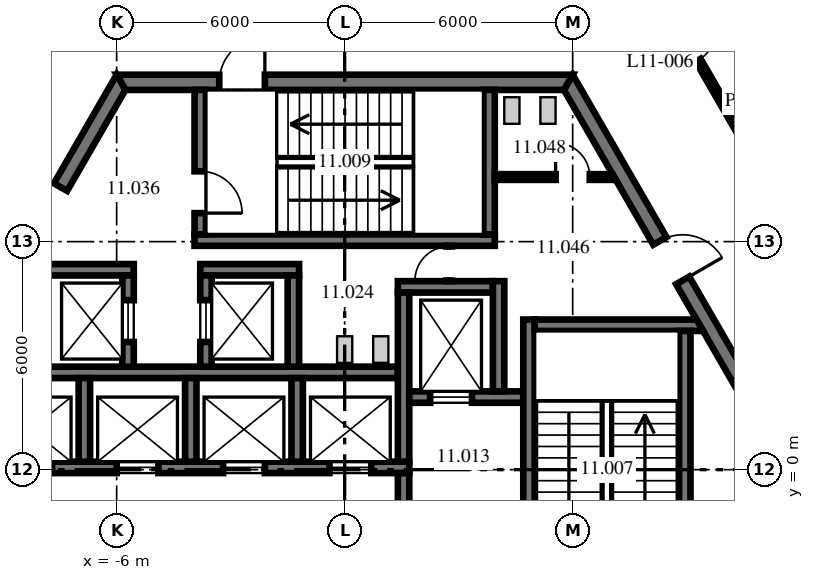
"""IFC4 building model, lengths in metres.
Left out: names, types, materials, properties, quantities, classifications, styles, units other than length and angle.
Written with IfcOpenShell. Run it as: python <this file> out.ifc"""

import sys

from ifc_helpers import new_model, si_unit, direction, frame, frame_2d, origin, place, context, subcontext, project, spatial, polyline, rectangle, outline, extrude, source, transform, mapped, element, fill, save


model = new_model("IFC4")
c1 = context("Model", 3, precision=1e-05, world=origin(), true_north=direction((0.0, 1.0)))
c2 = subcontext(c1, "Body", "Model", "MODEL_VIEW")
j1 = project(units=[si_unit("LENGTHUNIT", "METRE"), si_unit("PLANEANGLEUNIT", "RADIAN")], contexts=[c1])
p1 = place(None, origin())
s1 = spatial("IfcSite", under=j1, at=p1, CompositionType="ELEMENT")
p2 = place(p1, origin())
s2 = spatial("IfcBuilding", under=s1, at=p2, CompositionType="ELEMENT")
p3 = place(p2, frame((0.0, 0.0, 50.4)))
s3 = spatial("IfcBuildingStorey", under=s2, at=p3, CompositionType="ELEMENT", Elevation=50.4)
m1 = source(origin(), c2, "Body", "SweptSolid", [
    extrude(outline(polyline([(-0.115, -0.2), (11.885, -0.2), (11.654, 0.2), (0.115, 0.2), (-0.115, -0.2)])), origin(), (0.0, 0.0, 1.0), 4.05),
])
p4 = place(p3, frame((11.769, 0.0, 0.0), z_axis=(0.0, 0.0, 1.0), x_axis=(-0.499996592174, 0.866027371285, 0.0)))
e1 = element("IfcWall", 1, at=p4, inside=s3, PredefinedType="SHEAR", context=c2, shape_type="MappedRepresentation", body=[
    mapped(m1, transform((0.0, 0.0, 0.0), scale=1.0)),
])
p5 = place(p4, frame((5.75, 0.0, 0.0)))
e2 = element("IfcOpeningElement", 2, at=p5, cuts=e1, PredefinedType="OPENING", context=c2, shape_type="SweptSolid", body=[
    extrude(rectangle(XDim=1.2, YDim=2.1, at=frame_2d((0.6, 1.05))), frame((0.0, 0.21, 0.0), z_axis=(0.0, -1.0, 0.0), x_axis=(1.0, 0.0, 0.0)), (0.0, 0.0, 1.0), 0.42),
])
p6 = place(p3, frame((5.885, 10.192, 0.0), z_axis=(0.0, 0.0, 1.0), x_axis=(-1.0, 0.0, 0.0)))
e3 = element("IfcWall", 3, at=p6, inside=s3, PredefinedType="SHEAR", context=c2, shape_type="MappedRepresentation", body=[
    mapped(m1, transform((0.0, 0.0, 0.0), scale=1.0)),
])
p7 = place(p6, frame((7.985, 0.0, 0.0)))
e4 = element("IfcOpeningElement", 4, at=p7, cuts=e3, PredefinedType="OPENING", context=c2, shape_type="SweptSolid", body=[
    extrude(rectangle(XDim=1.2, YDim=2.1, at=frame_2d((0.6, 1.05))), frame((0.0, 0.21, 0.0), z_axis=(0.0, -1.0, 0.0), x_axis=(1.0, 0.0, 0.0)), (0.0, 0.0, 1.0), 0.42),
])
p8 = place(p3, frame((-5.885, 10.192, 0.0), z_axis=(0.0, 0.0, 1.0), x_axis=(-0.499996592174, -0.866027371285, 0.0)))
e5 = element("IfcWall", 5, at=p8, inside=s3, PredefinedType="SHEAR", context=c2, shape_type="MappedRepresentation", body=[
    mapped(m1, transform((0.0, 0.0, 0.0), scale=1.0)),
])
p9 = place(p8, frame((3.185, 0.0, 0.0)))
e6 = element("IfcOpeningElement", 6, at=p9, cuts=e5, PredefinedType="OPENING", context=c2, shape_type="SweptSolid", body=[
    extrude(rectangle(XDim=1.2, YDim=2.1, at=frame_2d((0.6, 1.05))), frame((0.0, 0.21, 0.0), z_axis=(0.0, -1.0, 0.0), x_axis=(1.0, 0.0, 0.0)), (0.0, 0.0, 1.0), 0.42),
])
p10 = place(p3, frame((-11.769, 0.0, 0.0), z_axis=(0.0, 0.0, 1.0), x_axis=(0.499996592174, -0.866027371285, 0.0)))
e7 = element("IfcWall", 7, at=p10, inside=s3, PredefinedType="SHEAR", context=c2, shape_type="MappedRepresentation", body=[
    mapped(m1, transform((0.0, 0.0, 0.0), scale=1.0)),
])
p11 = place(p10, frame((1.405, 0.0, 0.0)))
e8 = element("IfcOpeningElement", 8, at=p11, cuts=e7, PredefinedType="OPENING", context=c2, shape_type="SweptSolid", body=[
    extrude(rectangle(XDim=1.8, YDim=2.1, at=frame_2d((0.9, 1.05))), frame((0.0, 0.21, 0.0), z_axis=(0.0, -1.0, 0.0), x_axis=(1.0, 0.0, 0.0)), (0.0, 0.0, 1.0), 0.42),
])
p12 = place(p10, frame((7.915, 0.0, 0.0)))
e9 = element("IfcOpeningElement", 9, at=p12, cuts=e7, PredefinedType="OPENING", context=c2, shape_type="SweptSolid", body=[
    extrude(rectangle(XDim=1.2, YDim=2.1, at=frame_2d((0.6, 1.05))), frame((0.0, 0.21, 0.0), z_axis=(0.0, -1.0, 0.0), x_axis=(1.0, 0.0, 0.0)), (0.0, 0.0, 1.0), 0.42),
])
p13 = place(p3, frame((5.885, -10.192, 0.0), z_axis=(0.0, 0.0, 1.0), x_axis=(0.499996592174, 0.866027371285, 0.0)))
e10 = element("IfcWall", 10, at=p13, inside=s3, PredefinedType="SHEAR", context=c2, shape_type="MappedRepresentation", body=[
    mapped(m1, transform((0.0, 0.0, 0.0), scale=1.0)),
])
p14 = place(p13, frame((3.665, 0.0, 0.0)))
e11 = element("IfcOpeningElement", 11, at=p14, cuts=e10, PredefinedType="OPENING", context=c2, shape_type="SweptSolid", body=[
    extrude(rectangle(XDim=1.2, YDim=2.1, at=frame_2d((0.6, 1.05))), frame((0.0, 0.21, 0.0), z_axis=(0.0, -1.0, 0.0), x_axis=(1.0, 0.0, 0.0)), (0.0, 0.0, 1.0), 0.42),
])
p15 = place(p3, frame((-9.8, 0.06, 0.0), z_axis=(0.0, 0.0, 1.0), x_axis=(1.0, 0.0, 0.0)))
e12 = element("IfcWall", 12, at=p15, inside=s3, PredefinedType="SHEAR", context=c2, shape_type="SweptSolid", body=[
    extrude(rectangle(XDim=11.5, YDim=0.3, at=frame_2d((5.75, 0.0))), origin(), (0.0, 0.0, 1.0), 4.05),
])
p16 = place(p15, frame((1.0, 0.0, 0.0)))
e13 = element("IfcOpeningElement", 13, at=p16, cuts=e12, PredefinedType="OPENING", context=c2, shape_type="SweptSolid", body=[
    extrude(rectangle(XDim=1.1, YDim=2.1, at=frame_2d((0.55, 1.05))), frame((0.0, 0.16, 0.0), z_axis=(0.0, -1.0, 0.0), x_axis=(1.0, 0.0, 0.0)), (0.0, 0.0, 1.0), 0.32),
])
p17 = place(p15, frame((3.8, 0.0, 0.0)))
e14 = element("IfcOpeningElement", 14, at=p17, cuts=e12, PredefinedType="OPENING", context=c2, shape_type="SweptSolid", body=[
    extrude(rectangle(XDim=1.1, YDim=2.1, at=frame_2d((0.55, 1.05))), frame((0.0, 0.16, 0.0), z_axis=(0.0, -1.0, 0.0), x_axis=(1.0, 0.0, 0.0)), (0.0, 0.0, 1.0), 0.32),
])
p18 = place(p15, frame((6.6, 0.0, 0.0)))
e15 = element("IfcOpeningElement", 15, at=p18, cuts=e12, PredefinedType="OPENING", context=c2, shape_type="SweptSolid", body=[
    extrude(rectangle(XDim=1.1, YDim=2.1, at=frame_2d((0.55, 1.05))), frame((0.0, 0.16, 0.0), z_axis=(0.0, -1.0, 0.0), x_axis=(1.0, 0.0, 0.0)), (0.0, 0.0, 1.0), 0.32),
])
p19 = place(p15, frame((9.4, 0.0, 0.0)))
e16 = element("IfcOpeningElement", 16, at=p19, cuts=e12, PredefinedType="OPENING", context=c2, shape_type="SweptSolid", body=[
    extrude(rectangle(XDim=1.1, YDim=2.1, at=frame_2d((0.55, 1.05))), frame((0.0, 0.16, 0.0), z_axis=(0.0, -1.0, 0.0), x_axis=(1.0, 0.0, 0.0)), (0.0, 0.0, 1.0), 0.32),
])
p20 = place(p3, frame((-9.8, 2.56, 0.0), z_axis=(0.0, 0.0, 1.0), x_axis=(1.0, 0.0, 0.0)))
e17 = element("IfcWall", 17, at=p20, inside=s3, PredefinedType="SHEAR", context=c2, shape_type="SweptSolid", body=[
    extrude(outline(polyline([(11.2, -0.15), (-0.349, -0.15), (-0.176, 0.15), (11.2, 0.15), (11.2, -0.15)])), origin(), (0.0, 0.0, 1.0), 4.05),
])
m2 = source(origin(), c2, "Body", "SweptSolid", [
    extrude(rectangle(XDim=2.5, YDim=0.3, at=frame_2d((1.25, 0.0))), origin(), (0.0, 0.0, 1.0), 4.05),
])
p21 = place(p3, frame((1.4, 4.81, 0.0), z_axis=(0.0, 0.0, 1.0), x_axis=(1.0, 0.0, 0.0)))
e18 = element("IfcWall", 18, at=p21, inside=s3, PredefinedType="SHEAR", context=c2, shape_type="MappedRepresentation", body=[
    mapped(m2, transform((0.0, 0.0, 0.0), scale=1.0)),
])
p22 = place(p3, frame((1.55, 0.21, 0.0), z_axis=(0.0, 0.0, 1.0), x_axis=(0.0, 1.0, 0.0)))
e19 = element("IfcWall", 19, at=p22, inside=s3, PredefinedType="SHEAR", context=c2, shape_type="SweptSolid", body=[
    extrude(rectangle(XDim=4.45, YDim=0.3, at=frame_2d((2.225, 0.0))), origin(), (0.0, 0.0, 1.0), 4.05),
])
m3 = source(origin(), c2, "Body", "SweptSolid", [
    extrude(rectangle(XDim=3.0, YDim=0.3, at=frame_2d((1.5, 0.0))), origin(), (0.0, 0.0, 1.0), 4.05),
])
p23 = place(p3, frame((1.7, 1.91, 0.0), z_axis=(0.0, 0.0, 1.0), x_axis=(1.0, 0.0, 0.0)))
e20 = element("IfcWall", 20, at=p23, inside=s3, PredefinedType="SHEAR", context=c2, shape_type="MappedRepresentation", body=[
    mapped(m3, transform((0.0, 0.0, 0.0), scale=1.0)),
])
p24 = place(p23, frame((0.55, 0.0, 0.0)))
e21 = element("IfcOpeningElement", 21, at=p24, cuts=e20, PredefinedType="OPENING", context=c2, shape_type="SweptSolid", body=[
    extrude(rectangle(XDim=1.1, YDim=2.1, at=frame_2d((0.55, 1.05))), frame((0.0, 0.16, 0.0), z_axis=(0.0, -1.0, 0.0), x_axis=(1.0, 0.0, 0.0)), (0.0, 0.0, 1.0), 0.32),
])
p25 = place(p3, frame((4.05, 2.06, 0.0), z_axis=(0.0, 0.0, 1.0), x_axis=(0.0, 1.0, 0.0)))
e22 = element("IfcWall", 22, at=p25, inside=s3, PredefinedType="SHEAR", context=c2, shape_type="SweptSolid", body=[
    extrude(rectangle(XDim=2.9, YDim=0.3, at=frame_2d((1.45, 0.0))), origin(), (0.0, 0.0, 1.0), 4.05),
])
p26 = place(p3, frame((1.55, -3.09, 0.0), z_axis=(0.0, 0.0, 1.0), x_axis=(0.0, 1.0, 0.0)))
e23 = element("IfcWall", 23, at=p26, inside=s3, PredefinedType="SHEAR", context=c2, shape_type="MappedRepresentation", body=[
    mapped(m3, transform((0.0, 0.0, 0.0), scale=1.0)),
])
p27 = place(p26, frame((0.9, 0.0, 0.0)))
e24 = element("IfcOpeningElement", 24, at=p27, cuts=e23, PredefinedType="OPENING", context=c2, shape_type="SweptSolid", body=[
    extrude(rectangle(XDim=1.2, YDim=2.1, at=frame_2d((0.6, 1.05))), frame((0.0, 0.16, 0.0), z_axis=(0.0, -1.0, 0.0), x_axis=(1.0, 0.0, 0.0)), (0.0, 0.0, 1.0), 0.32),
])
p28 = place(p3, frame((4.85, -6.04, 0.0), z_axis=(0.0, 0.0, 1.0), x_axis=(0.0, 1.0, 0.0)))
e25 = element("IfcWall", 25, at=p28, inside=s3, PredefinedType="SHEAR", context=c2, shape_type="SweptSolid", body=[
    extrude(outline(polyline([(-0.15, -0.15), (9.99, -0.15), (9.99, 0.15), (0.15, 0.15), (-0.15, -0.15)])), origin(), (0.0, 0.0, 1.0), 4.05),
])
p29 = place(p28, frame((3.19, 0.0, 0.0)))
e26 = element("IfcOpeningElement", 26, at=p29, cuts=e25, PredefinedType="OPENING", context=c2, shape_type="SweptSolid", body=[
    extrude(rectangle(XDim=1.1, YDim=2.1, at=frame_2d((0.55, 1.05))), frame((0.0, 0.16, 0.0), z_axis=(0.0, -1.0, 0.0), x_axis=(1.0, 0.0, 0.0)), (0.0, 0.0, 1.0), 0.32),
])
p30 = place(p3, frame((5.0, 3.8, 0.0), z_axis=(0.0, 0.0, 1.0), x_axis=(1.0, 0.0, 0.0)))
e27 = element("IfcWall", 27, at=p30, inside=s3, PredefinedType="SHEAR", context=c2, shape_type="SweptSolid", body=[
    extrude(outline(polyline([(0.0, -0.15), (0.0, 0.15), (4.26, 0.15), (4.433, -0.15), (0.0, -0.15)])), origin(), (0.0, 0.0, 1.0), 4.05),
])
p31 = place(p3, frame((8.95, -3.65, 0.0), z_axis=(0.0, 0.0, 1.0), x_axis=(0.0, 1.0, 0.0)))
e28 = element("IfcWall", 28, at=p31, inside=s3, PredefinedType="SHEAR", context=c2, shape_type="SweptSolid", body=[
    extrude(rectangle(XDim=7.3, YDim=0.3, at=frame_2d((3.65, 0.0))), origin(), (0.0, 0.0, 1.0), 4.05),
])
p32 = place(p3, frame((-3.95, 6.04, 0.0), z_axis=(0.0, 0.0, 1.0), x_axis=(1.0, 0.0, 0.0)))
e29 = element("IfcWall", 29, at=p32, inside=s3, PredefinedType="SHEAR", context=c2, shape_type="SweptSolid", body=[
    extrude(rectangle(XDim=7.9, YDim=0.3, at=frame_2d((3.95, 0.0))), origin(), (0.0, 0.0, 1.0), 4.05),
])
m4 = source(origin(), c2, "Body", "SweptSolid", [
    extrude(outline(polyline([(0.0, -0.15), (0.0, 0.15), (3.804, 0.15), (3.804, -0.15), (0.0, -0.15)])), origin(), (0.0, 0.0, 1.0), 4.05),
])
p33 = place(p3, frame((-3.8, 6.19, 0.0), z_axis=(0.0, 0.0, 1.0), x_axis=(0.0, 1.0, 0.0)))
e30 = element("IfcWall", 30, at=p33, inside=s3, PredefinedType="SHEAR", context=c2, shape_type="MappedRepresentation", body=[
    mapped(m4, transform((0.0, 0.0, 0.0), scale=1.0)),
])
p34 = place(p33, frame((0.56, 0.0, 0.0)))
e31 = element("IfcOpeningElement", 31, at=p34, cuts=e30, PredefinedType="OPENING", context=c2, shape_type="SweptSolid", body=[
    extrude(rectangle(XDim=1.1, YDim=2.1, at=frame_2d((0.55, 1.05))), frame((0.0, 0.16, 0.0), z_axis=(0.0, -1.0, 0.0), x_axis=(1.0, 0.0, 0.0)), (0.0, 0.0, 1.0), 0.32),
])
p35 = place(p3, frame((3.8, 6.19, 0.0), z_axis=(0.0, 0.0, 1.0), x_axis=(0.0, 1.0, 0.0)))
e32 = element("IfcWall", 32, at=p35, inside=s3, PredefinedType="SHEAR", context=c2, shape_type="MappedRepresentation", body=[
    mapped(m4, transform((0.0, 0.0, 0.0), scale=1.0)),
])
p36 = place(p3, frame((-8.15, 5.26, 0.0), z_axis=(0.0, 0.0, 1.0), x_axis=(1.0, 0.0, 0.0)))
e33 = element("IfcWall", 33, at=p36, inside=s3, PredefinedType="SHEAR", context=c2, shape_type="SweptSolid", body=[
    extrude(outline(polyline([(2.6, -0.15), (-0.44, -0.15), (-0.267, 0.15), (2.6, 0.15), (2.6, -0.15)])), origin(), (0.0, 0.0, 1.0), 4.05),
])
m5 = source(origin(), c2, "Body", "SweptSolid", [
    extrude(rectangle(XDim=2.4, YDim=0.3, at=frame_2d((1.2, 0.0))), origin(), (0.0, 0.0, 1.0), 4.05),
])
p37 = place(p3, frame((-5.7, 2.71, 0.0), z_axis=(0.0, 0.0, 1.0), x_axis=(0.0, 1.0, 0.0)))
e34 = element("IfcWall", 34, at=p37, inside=s3, PredefinedType="SHEAR", context=c2, shape_type="MappedRepresentation", body=[
    mapped(m5, transform((0.0, 0.0, 0.0), scale=1.0)),
])
p38 = place(p37, frame((0.65, 0.0, 0.0)))
e35 = element("IfcOpeningElement", 35, at=p38, cuts=e34, PredefinedType="OPENING", context=c2, shape_type="SweptSolid", body=[
    extrude(rectangle(XDim=1.1, YDim=2.1, at=frame_2d((0.55, 1.05))), frame((0.0, 0.16, 0.0), z_axis=(0.0, -1.0, 0.0), x_axis=(1.0, 0.0, 0.0)), (0.0, 0.0, 1.0), 0.32),
])
p39 = place(p3, frame((-3.8, 5.26, 0.0), z_axis=(0.0, 0.0, 1.0), x_axis=(1.0, 0.0, 0.0)))
e36 = element("IfcWall", 36, at=p39, inside=s3, PredefinedType="SHEAR", context=c2, shape_type="SweptSolid", body=[
    extrude(rectangle(XDim=2.6, YDim=0.3, at=frame_2d((1.3, 0.0))), origin(), (0.0, 0.0, 1.0), 4.05),
])
p40 = place(p3, frame((-3.65, 2.71, 0.0), z_axis=(0.0, 0.0, 1.0), x_axis=(0.0, 1.0, 0.0)))
e37 = element("IfcWall", 37, at=p40, inside=s3, PredefinedType="SHEAR", context=c2, shape_type="MappedRepresentation", body=[
    mapped(m5, transform((0.0, 0.0, 0.0), scale=1.0)),
])
p41 = place(p40, frame((0.65, 0.0, 0.0)))
e38 = element("IfcOpeningElement", 38, at=p41, cuts=e37, PredefinedType="OPENING", context=c2, shape_type="SweptSolid", body=[
    extrude(rectangle(XDim=1.1, YDim=2.1, at=frame_2d((0.55, 1.05))), frame((0.0, 0.16, 0.0), z_axis=(0.0, -1.0, 0.0), x_axis=(1.0, 0.0, 0.0)), (0.0, 0.0, 1.0), 0.32),
])
p42 = place(p3, frame((-1.35, 2.71, 0.0), z_axis=(0.0, 0.0, 1.0), x_axis=(0.0, 1.0, 0.0)))
e39 = element("IfcWall", 39, at=p42, inside=s3, PredefinedType="SHEAR", context=c2, shape_type="MappedRepresentation", body=[
    mapped(m5, transform((0.0, 0.0, 0.0), scale=1.0)),
])
m6 = source(origin(), c2, "Body", "SweptSolid", [
    extrude(rectangle(XDim=2.2, YDim=0.3, at=frame_2d((1.1, 0.0))), origin(), (0.0, 0.0, 1.0), 4.05),
])
for number, where, z_axis, x_axis in (
    (40, (-6.85, 0.21, 0.0), (0.0, 0.0, 1.0), (0.0, 1.0, 0.0)),
    (41, (-4.05, 0.21, 0.0), (0.0, 0.0, 1.0), (0.0, 1.0, 0.0)),
    (42, (-1.25, 0.21, 0.0), (0.0, 0.0, 1.0), (0.0, 1.0, 0.0)),
):
    element("IfcWall", number, at=place(p3, frame(where, z_axis=z_axis, x_axis=x_axis)), inside=s3, PredefinedType="SHEAR", context=c2, shape_type="MappedRepresentation", body=[
        mapped(m6, transform((0.0, 0.0, 0.0), scale=1.0)),
    ])
p43 = place(p3, frame((3.95, 7.7, 0.0), z_axis=(0.0, 0.0, 1.0), x_axis=(1.0, 0.0, 0.0)))
e43 = element("IfcWall", 43, at=p43, inside=s3, PredefinedType="PARTITIONING", context=c2, shape_type="SweptSolid", body=[
    extrude(outline(polyline([(0.0, -0.075), (0.0, 0.075), (3.102, 0.075), (3.188, -0.075), (0.0, -0.075)])), origin(), (0.0, 0.0, 1.0), 4.05),
])
p44 = place(p43, frame((1.6, 0.0, 0.0)))
e44 = element("IfcOpeningElement", 44, at=p44, cuts=e43, PredefinedType="OPENING", context=c2, shape_type="SweptSolid", body=[
    extrude(rectangle(XDim=0.9, YDim=2.1, at=frame_2d((0.45, 1.05))), frame((0.0, 0.085, 0.0), z_axis=(0.0, -1.0, 0.0), x_axis=(1.0, 0.0, 0.0)), (0.0, 0.0, 1.0), 0.17),
])
p45 = place(p3, frame((2.75, 4.96, 0.0), z_axis=(0.0, 0.0, 1.0), x_axis=(0.0, 1.0, 0.0)))
e45 = element("IfcWall", 45, at=p45, inside=s3, PredefinedType="PARTITIONING", context=c2, shape_type="SweptSolid", body=[
    extrude(rectangle(XDim=0.93, YDim=0.15, at=frame_2d((0.465, 0.0))), origin(), (0.0, 0.0, 1.0), 4.05),
])
p46 = place(p45, frame((0.015, 0.0, 0.0)))
e46 = element("IfcOpeningElement", 46, at=p46, cuts=e45, PredefinedType="OPENING", context=c2, shape_type="SweptSolid", body=[
    extrude(rectangle(XDim=0.9, YDim=2.1, at=frame_2d((0.45, 1.05))), frame((0.0, 0.085, 0.0), z_axis=(0.0, -1.0, 0.0), x_axis=(1.0, 0.0, 0.0)), (0.0, 0.0, 1.0), 0.17),
])
p47 = place(p3, frame((7.761, 13.442, 0.0), z_axis=(0.0, 0.0, 1.0), x_axis=(0.500005339912, -0.866022320763, 0.0)))
e47 = element("IfcWall", 47, at=p47, inside=s3, PredefinedType="PARTITIONING", context=c2, shape_type="SweptSolid", body=[
    extrude(rectangle(XDim=9.338, YDim=0.15, at=frame_2d((4.669, 0.0))), origin(), (0.0, 0.0, 1.0), 4.05),
])
p48 = place(p47, frame((2.183, 0.0, 0.0)))
e48 = element("IfcOpeningElement", 48, at=p48, cuts=e47, PredefinedType="OPENING", context=c2, shape_type="SweptSolid", body=[
    extrude(rectangle(XDim=0.9, YDim=2.1, at=frame_2d((0.45, 1.05))), frame((0.0, 0.085, 0.0), z_axis=(0.0, -1.0, 0.0), x_axis=(1.0, 0.0, 0.0)), (0.0, 0.0, 1.0), 0.17),
])
p49 = place(p7, frame((1.2, 0.0, 0.0), z_axis=(0.0, 0.0, 1.0), x_axis=(-1.0, 0.0, 0.0)))
e49 = element("IfcDoor", 49, at=p49, inside=s3, OperationType="SINGLE_SWING_RIGHT", PredefinedType="DOOR", context=c2, shape_type="SweptSolid", body=[
    extrude(rectangle(XDim=1.2, YDim=2.1, at=frame_2d((0.6, 1.05))), frame((0.0, 0.025, 0.0), z_axis=(0.0, -1.0, 0.0), x_axis=(1.0, 0.0, 0.0)), (0.0, 0.0, 1.0), 0.05),
])
fill(e4, e49)
p50 = place(p9, frame((1.2, 0.0, 0.0), z_axis=(0.0, 0.0, 1.0), x_axis=(-1.0, 0.0, 0.0)))
e50 = element("IfcDoor", 50, at=p50, inside=s3, OperationType="SINGLE_SWING_RIGHT", PredefinedType="DOOR", context=c2, shape_type="SweptSolid", body=[
    extrude(rectangle(XDim=1.2, YDim=2.1, at=frame_2d((0.6, 1.05))), frame((0.0, 0.025, 0.0), z_axis=(0.0, -1.0, 0.0), x_axis=(1.0, 0.0, 0.0)), (0.0, 0.0, 1.0), 0.05),
])
fill(e6, e50)
p51 = place(p5, frame((1.2, 0.0, 0.0), z_axis=(0.0, 0.0, 1.0), x_axis=(-1.0, 0.0, 0.0)))
e51 = element("IfcDoor", 51, at=p51, inside=s3, OperationType="SINGLE_SWING_RIGHT", PredefinedType="DOOR", context=c2, shape_type="SweptSolid", body=[
    extrude(rectangle(XDim=1.2, YDim=2.1, at=frame_2d((0.6, 1.05))), frame((0.0, 0.025, 0.0), z_axis=(0.0, -1.0, 0.0), x_axis=(1.0, 0.0, 0.0)), (0.0, 0.0, 1.0), 0.05),
])
fill(e2, e51)
p52 = place(p34, frame((1.1, 0.0, 0.0), z_axis=(0.0, 0.0, 1.0), x_axis=(-1.0, 0.0, 0.0)))
e52 = element("IfcDoor", 52, at=p52, inside=s3, OperationType="SINGLE_SWING_RIGHT", PredefinedType="DOOR", context=c2, shape_type="SweptSolid", body=[
    extrude(rectangle(XDim=1.1, YDim=2.1, at=frame_2d((0.55, 1.05))), frame((0.0, 0.025, 0.0), z_axis=(0.0, -1.0, 0.0), x_axis=(1.0, 0.0, 0.0)), (0.0, 0.0, 1.0), 0.05),
])
fill(e31, e52)
p53 = place(p46, origin())
e53 = element("IfcDoor", 53, at=p53, inside=s3, OperationType="SINGLE_SWING_LEFT", PredefinedType="DOOR", context=c2, shape_type="SweptSolid", body=[
    extrude(rectangle(XDim=0.9, YDim=2.1, at=frame_2d((0.45, 1.05))), frame((0.0, 0.025, 0.0), z_axis=(0.0, -1.0, 0.0), x_axis=(1.0, 0.0, 0.0)), (0.0, 0.0, 1.0), 0.05),
])
fill(e46, e53)
p54 = place(p44, origin())
e54 = element("IfcDoor", 54, at=p54, inside=s3, OperationType="SINGLE_SWING_LEFT", PredefinedType="DOOR", context=c2, shape_type="SweptSolid", body=[
    extrude(rectangle(XDim=0.9, YDim=2.1, at=frame_2d((0.45, 1.05))), frame((0.0, 0.025, 0.0), z_axis=(0.0, -1.0, 0.0), x_axis=(1.0, 0.0, 0.0)), (0.0, 0.0, 1.0), 0.05),
])
fill(e44, e54)
p55 = place(p17, origin())
e55 = element("IfcDoor", 55, at=p55, inside=s3, OperationType="DOUBLE_DOOR_SLIDING", PredefinedType="DOOR", context=c2, shape_type="SweptSolid", body=[
    extrude(rectangle(XDim=1.1, YDim=2.1, at=frame_2d((0.55, 1.05))), frame((0.0, 0.025, 0.0), z_axis=(0.0, -1.0, 0.0), x_axis=(1.0, 0.0, 0.0)), (0.0, 0.0, 1.0), 0.05),
])
fill(e14, e55)
p56 = place(p18, origin())
e56 = element("IfcDoor", 56, at=p56, inside=s3, OperationType="DOUBLE_DOOR_SLIDING", PredefinedType="DOOR", context=c2, shape_type="SweptSolid", body=[
    extrude(rectangle(XDim=1.1, YDim=2.1, at=frame_2d((0.55, 1.05))), frame((0.0, 0.025, 0.0), z_axis=(0.0, -1.0, 0.0), x_axis=(1.0, 0.0, 0.0)), (0.0, 0.0, 1.0), 0.05),
])
fill(e15, e56)
p57 = place(p19, origin())
e57 = element("IfcDoor", 57, at=p57, inside=s3, OperationType="DOUBLE_DOOR_SLIDING", PredefinedType="DOOR", context=c2, shape_type="SweptSolid", body=[
    extrude(rectangle(XDim=1.1, YDim=2.1, at=frame_2d((0.55, 1.05))), frame((0.0, 0.025, 0.0), z_axis=(0.0, -1.0, 0.0), x_axis=(1.0, 0.0, 0.0)), (0.0, 0.0, 1.0), 0.05),
])
fill(e16, e57)
p58 = place(p24, origin())
e58 = element("IfcDoor", 58, at=p58, inside=s3, OperationType="DOUBLE_DOOR_SLIDING", PredefinedType="DOOR", context=c2, shape_type="SweptSolid", body=[
    extrude(rectangle(XDim=1.1, YDim=2.1, at=frame_2d((0.55, 1.05))), frame((0.0, 0.025, 0.0), z_axis=(0.0, -1.0, 0.0), x_axis=(1.0, 0.0, 0.0)), (0.0, 0.0, 1.0), 0.05),
])
fill(e21, e58)
p59 = place(p38, origin())
e59 = element("IfcDoor", 59, at=p59, inside=s3, OperationType="DOUBLE_DOOR_SLIDING", PredefinedType="DOOR", context=c2, shape_type="SweptSolid", body=[
    extrude(rectangle(XDim=1.1, YDim=2.1, at=frame_2d((0.55, 1.05))), frame((0.0, 0.025, 0.0), z_axis=(0.0, -1.0, 0.0), x_axis=(1.0, 0.0, 0.0)), (0.0, 0.0, 1.0), 0.05),
])
fill(e35, e59)
p60 = place(p41, origin())
e60 = element("IfcDoor", 60, at=p60, inside=s3, OperationType="DOUBLE_DOOR_SLIDING", PredefinedType="DOOR", context=c2, shape_type="SweptSolid", body=[
    extrude(rectangle(XDim=1.1, YDim=2.1, at=frame_2d((0.55, 1.05))), frame((0.0, 0.025, 0.0), z_axis=(0.0, -1.0, 0.0), x_axis=(1.0, 0.0, 0.0)), (0.0, 0.0, 1.0), 0.05),
])
fill(e38, e60)
p61 = place(p48, origin())
e61 = element("IfcDoor", 61, at=p61, inside=s3, OperationType="SINGLE_SWING_LEFT", PredefinedType="DOOR", context=c2, shape_type="SweptSolid", body=[
    extrude(rectangle(XDim=0.9, YDim=2.1, at=frame_2d((0.45, 1.05))), frame((0.0, 0.025, 0.0), z_axis=(0.0, -1.0, 0.0), x_axis=(1.0, 0.0, 0.0)), (0.0, 0.0, 1.0), 0.05),
])
fill(e48, e61)
save(model, sys.argv[1])
